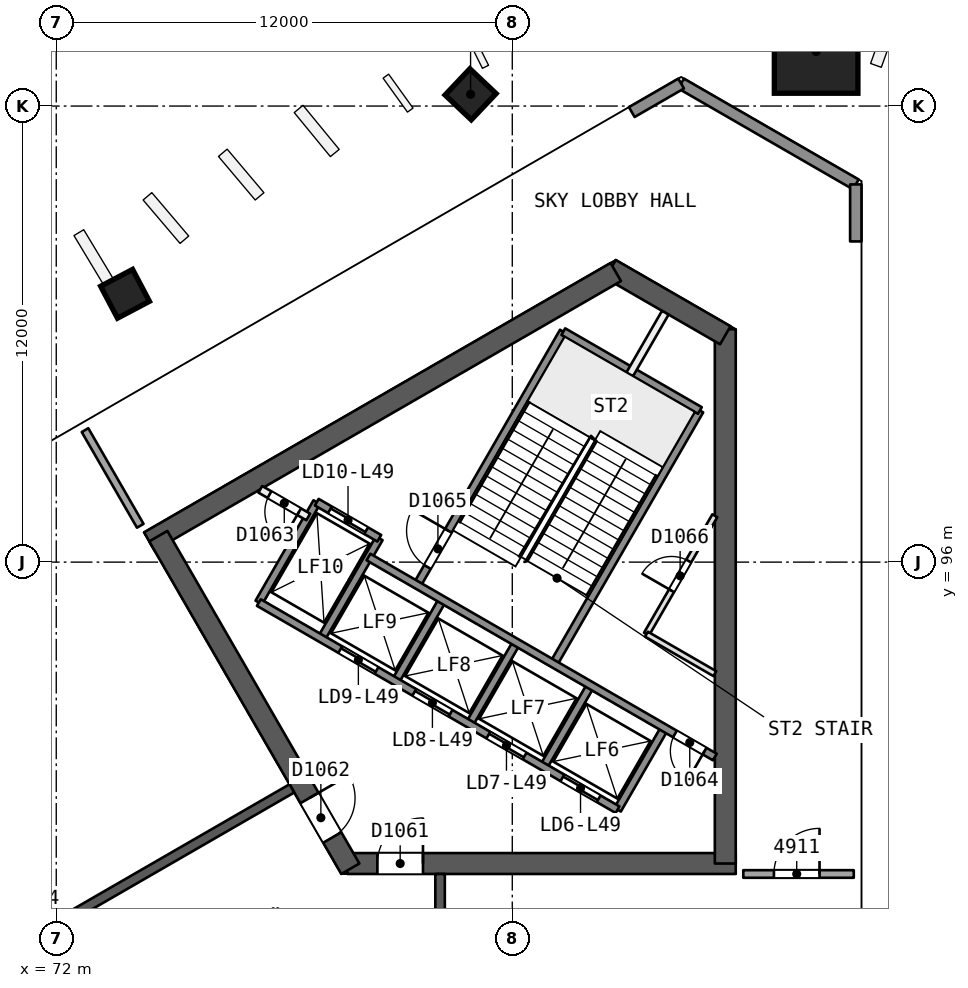
"""IFC4 building model, lengths in metres.
Left out: names, types, materials, properties, quantities, classifications, styles, units other than length and angle.
Written with IfcOpenShell. Run it as: python <this file> out.ifc"""

import sys

from ifc_helpers import new_model, si_unit, direction, frame, frame_2d, origin, origin_2d, place, context, subcontext, project, spatial, rectangle, extrude, element, fill, save


model = new_model("IFC4")
c1 = context("Model", 3, precision=1e-05, world=origin(), true_north=direction((0.0, 1.0)))
c2 = subcontext(c1, "Body", "Model", "MODEL_VIEW")
j1 = project(units=[si_unit("LENGTHUNIT", "METRE"), si_unit("PLANEANGLEUNIT", "RADIAN")], contexts=[c1])
p1 = place(None, origin())
s1 = spatial("IfcSite", under=j1, at=p1, CompositionType="ELEMENT")
p2 = place(p1, origin())
s2 = spatial("IfcBuilding", under=s1, at=p2, CompositionType="ELEMENT")
p3 = place(p2, frame((0.0, 0.0, 201.4)))
s3 = spatial("IfcBuildingStorey", under=s2, at=p3, CompositionType="ELEMENT", Elevation=201.4)
p4 = place(p3, frame((79.659, 88.069, 0.0), z_axis=(0.0, 0.0, 1.0), x_axis=(1.0, 0.0, 0.0)))
e1 = element("IfcWall", 1, at=p4, inside=s3, PredefinedType="SHEAR", context=c2, shape_type="SweptSolid", body=[
    extrude(rectangle(XDim=10.221, YDim=0.55, at=frame_2d((5.111, 0.0))), origin(), (0.0, 0.0, 1.0), 4.4),
])
p5 = place(p4, frame((0.791, 0.0, 0.0)))
e2 = element("IfcOpeningElement", 2, at=p5, cuts=e1, PredefinedType="OPENING", context=c2, shape_type="SweptSolid", body=[
    extrude(rectangle(XDim=1.2, YDim=2.1, at=frame_2d((0.6, 1.05))), frame((0.0, 0.286, 0.0), z_axis=(0.0, -1.0, 0.0), x_axis=(1.0, 0.0, 0.0)), (0.0, 0.0, 1.0), 0.571),
])
p6 = place(p3, frame((89.605, 88.069, 0.0), z_axis=(0.0, 0.0, 1.0), x_axis=(0.0, 1.0, 0.0)))
e3 = element("IfcWall", 3, at=p6, inside=s3, PredefinedType="SHEAR", context=c2, shape_type="SweptSolid", body=[
    extrude(rectangle(XDim=14.058, YDim=0.55, at=frame_2d((7.029, 0.0))), origin(), (0.0, 0.0, 1.0), 4.4),
])
p7 = place(p3, frame((89.605, 101.969, 0.0), z_axis=(0.0, 0.0, 1.0), x_axis=(-0.865997833373, 0.500047750313, 0.0)))
e4 = element("IfcWall", 4, at=p7, inside=s3, PredefinedType="SHEAR", context=c2, shape_type="SweptSolid", body=[
    extrude(rectangle(XDim=3.487, YDim=0.55, at=frame_2d((1.743, 0.0))), origin(), (0.0, 0.0, 1.0), 4.4),
])
p8 = place(p3, frame((86.723, 103.633, 0.0), z_axis=(0.0, 0.0, 1.0), x_axis=(-0.866023530946, -0.500003243837, 0.0)))
e5 = element("IfcWall", 5, at=p8, inside=s3, PredefinedType="SHEAR", context=c2, shape_type="SweptSolid", body=[
    extrude(rectangle(XDim=14.175, YDim=0.55, at=frame_2d((7.087, 0.0))), origin(), (0.0, 0.0, 1.0), 4.4),
])
p9 = place(p3, frame((74.686, 96.683, 0.0), z_axis=(0.0, 0.0, 1.0), x_axis=(0.499997818338, -0.866026663364, 0.0)))
e6 = element("IfcWall", 6, at=p9, inside=s3, PredefinedType="SHEAR", context=c2, shape_type="SweptSolid", body=[
    extrude(rectangle(XDim=10.105, YDim=0.55, at=frame_2d((5.052, 0.0))), origin(), (0.0, 0.0, 1.0), 4.4),
])
p10 = place(p9, frame((7.955, 0.0, 0.0)))
e7 = element("IfcOpeningElement", 7, at=p10, cuts=e6, PredefinedType="OPENING", context=c2, shape_type="SweptSolid", body=[
    extrude(rectangle(XDim=1.2, YDim=2.1, at=frame_2d((0.6, 1.05))), frame((0.0, 0.286, 0.0), z_axis=(0.0, -1.0, 0.0), x_axis=(1.0, 0.0, 0.0)), (0.0, 0.0, 1.0), 0.571),
])
p11 = place(p3, frame((82.1, 72.206, 0.0), z_axis=(0.0, 0.0, 1.0), x_axis=(0.0, 1.0, 0.0)))
e8 = element("IfcWall", 8, at=p11, inside=s3, PredefinedType="SHEAR", context=c2, shape_type="SweptSolid", body=[
    extrude(rectangle(XDim=15.588, YDim=0.25, at=frame_2d((7.794, 0.0))), origin(), (0.0, 0.0, 1.0), 4.0),
])
p12 = place(p11, frame((3.297, 0.0, 0.0)))
e9 = element("IfcOpeningElement", 9, at=p12, cuts=e8, PredefinedType="OPENING", context=c2, shape_type="SweptSolid", body=[
    extrude(rectangle(XDim=1.2, YDim=2.4, at=frame_2d((0.6, 1.2))), frame((0.0, 0.135, 0.0), z_axis=(0.0, -1.0, 0.0), x_axis=(1.0, 0.0, 0.0)), (0.0, 0.0, 1.0), 0.271),
])
p13 = place(p11, frame((11.091, 0.0, 0.0)))
e10 = element("IfcOpeningElement", 10, at=p13, cuts=e8, PredefinedType="OPENING", context=c2, shape_type="SweptSolid", body=[
    extrude(rectangle(XDim=1.2, YDim=2.4, at=frame_2d((0.6, 1.2))), frame((0.0, 0.135, 0.0), z_axis=(0.0, -1.0, 0.0), x_axis=(1.0, 0.0, 0.0)), (0.0, 0.0, 1.0), 0.271),
])
p14 = place(p3, frame((78.2, 90.046, 0.0), z_axis=(0.0, 0.0, 1.0), x_axis=(-0.866026492143, -0.499998114903, 0.0)))
e11 = element("IfcWall", 11, at=p14, inside=s3, PredefinedType="SHEAR", context=c2, shape_type="SweptSolid", body=[
    extrude(rectangle(XDim=15.588, YDim=0.25, at=frame_2d((7.794, 0.0))), origin(), (0.0, 0.0, 1.0), 4.0),
])
p15 = place(p14, frame((7.194, 0.0, 0.0)))
e12 = element("IfcOpeningElement", 12, at=p15, cuts=e11, PredefinedType="OPENING", context=c2, shape_type="SweptSolid", body=[
    extrude(rectangle(XDim=1.2, YDim=2.4, at=frame_2d((0.6, 1.2))), frame((0.0, 0.135, 0.0), z_axis=(0.0, -1.0, 0.0), x_axis=(1.0, 0.0, 0.0)), (0.0, 0.0, 1.0), 0.271),
])
p16 = place(p3, frame((92.017, 109.473, 0.0), z_axis=(-0.017633169529, -0.030497620254, 0.999379290606), x_axis=(0.500230591094, 0.865175313, 0.035228305505)))
e13 = element("IfcColumn", 13, at=p16, inside=s3, PredefinedType="COLUMN", context=c2, shape_type="SweptSolid", body=[
    extrude(rectangle(XDim=2.2, YDim=2.2, at=origin_2d()), origin(), (0.0, 0.0, 1.0), 4.403),
])
p17 = place(p3, frame((82.913, 108.343, 0.0), z_axis=(-0.008374576728, -0.028118611929, 0.999569512404), x_axis=(0.866035454693, 0.49952834229, 0.021307896754)))
e14 = element("IfcColumn", 14, at=p17, inside=s3, PredefinedType="COLUMN", context=c2, shape_type="SweptSolid", body=[
    extrude(rectangle(XDim=0.95, YDim=0.95, at=origin_2d()), origin(), (0.0, 0.0, 1.0), 4.402),
])
p18 = place(p3, frame((73.809, 103.087, 0.0), z_axis=(0.000832053271, -0.022798259613, 0.999739739655), x_axis=(0.866596562917, 0.498895634194, 0.010655670932)))
e15 = element("IfcColumn", 15, at=p18, inside=s3, PredefinedType="COLUMN", context=c2, shape_type="SweptSolid", body=[
    extrude(rectangle(XDim=0.95, YDim=0.95, at=origin_2d()), origin(), (0.0, 0.0, 1.0), 4.401),
])
p19 = place(p3, frame((90.079, 87.794, 0.0), z_axis=(0.0, 0.0, 1.0), x_axis=(1.0, 0.0, 0.0)))
e16 = element("IfcWall", 16, at=p19, inside=s3, PredefinedType="PARTITIONING", context=c2, shape_type="SweptSolid", body=[
    extrude(rectangle(XDim=2.906, YDim=0.2, at=frame_2d((1.453, 0.0))), origin(), (0.0, 0.0, 1.0), 4.0),
])
p20 = place(p19, frame((0.806, 0.0, 0.0)))
e17 = element("IfcOpeningElement", 17, at=p20, cuts=e16, PredefinedType="OPENING", context=c2, shape_type="SweptSolid", body=[
    extrude(rectangle(XDim=1.2, YDim=2.4, at=frame_2d((0.6, 1.2))), frame((0.0, 0.11, 0.0), z_axis=(0.0, -1.0, 0.0), x_axis=(1.0, 0.0, 0.0)), (0.0, 0.0, 1.0), 0.221),
])
p21 = place(p3, frame((72.757, 99.473, 0.0), z_axis=(0.0, 0.0, 1.0), x_axis=(0.499996306993, -0.866027535932, 0.0)))
e18 = element("IfcWall", 18, at=p21, inside=s3, PredefinedType="PARTITIONING", context=c2, shape_type="SweptSolid", body=[
    extrude(rectangle(XDim=2.907, YDim=0.2, at=frame_2d((1.453, 0.0))), origin(), (0.0, 0.0, 1.0), 4.0),
])
p22 = place(p3, frame((88.443, 108.592, 0.0), z_axis=(0.0, 0.0, 1.0), x_axis=(0.866029311292, -0.499993231937, 0.0)))
e19 = element("IfcWall", 19, at=p22, inside=s3, PredefinedType="SOLIDWALL", context=c2, shape_type="SweptSolid", body=[
    extrude(rectangle(XDim=5.307, YDim=0.3, at=frame_2d((2.654, 0.0))), origin(), (0.0, 0.0, 1.0), 4.0),
])
for number, where, z_axis, x_axis in (
    (20, (93.04, 105.938, 0.0), (0.0, 0.0, 1.0), (0.0, -1.0, 0.0)),
    (21, (87.144, 107.842, 0.0), (0.0, 0.0, 1.0), (0.866, 0.5, 0.0)),
):
    element("IfcWall", number, at=place(p3, frame(where, z_axis=z_axis, x_axis=x_axis)), inside=s3, PredefinedType="SOLIDWALL", context=c2, shape_type="SweptSolid", body=[
        extrude(rectangle(XDim=1.5, YDim=0.3, at=frame_2d((0.75, 0.0))), origin(), (0.0, 0.0, 1.0), 4.0),
    ])
p23 = place(p3, frame((86.77, 89.486, 0.0), z_axis=(0.0, 0.0, 1.0), x_axis=(0.499961042966, 0.86604789447, 0.0)))
e22 = element("IfcWall", 22, at=p23, inside=s3, PredefinedType="SOLIDWALL", context=c2, shape_type="SweptSolid", body=[
    extrude(rectangle(XDim=2.48, YDim=0.2, at=frame_2d((1.24, 0.0))), origin(), (0.0, 0.0, 1.0), 4.0),
])
p24 = place(p3, frame((87.531, 94.104, 0.0), z_axis=(0.0, 0.0, 1.0), x_axis=(0.500014173611, 0.866017220491, 0.0)))
e23 = element("IfcWall", 23, at=p24, inside=s3, PredefinedType="PARTITIONING", context=c2, shape_type="SweptSolid", body=[
    extrude(rectangle(XDim=3.598, YDim=0.15, at=frame_2d((1.799, 0.0))), origin(), (0.0, 0.0, 1.0), 4.0),
])
p25 = place(p24, frame((1.322, 0.0, 0.0)))
e24 = element("IfcOpeningElement", 24, at=p25, cuts=e23, PredefinedType="OPENING", context=c2, shape_type="SweptSolid", body=[
    extrude(rectangle(XDim=0.9, YDim=2.1, at=frame_2d((0.45, 1.05))), frame((0.0, 0.085, 0.0), z_axis=(0.0, -1.0, 0.0), x_axis=(1.0, 0.0, 0.0)), (0.0, 0.0, 1.0), 0.171),
])
p26 = place(p3, frame((84.821, 90.611, 0.0), z_axis=(0.0, 0.0, 1.0), x_axis=(0.499961042966, 0.86604789447, 0.0)))
e25 = element("IfcWall", 25, at=p26, inside=s3, PredefinedType="SOLIDWALL", context=c2, shape_type="SweptSolid", body=[
    extrude(rectangle(XDim=2.48, YDim=0.2, at=frame_2d((1.24, 0.0))), origin(), (0.0, 0.0, 1.0), 4.0),
])
p27 = place(p3, frame((85.087, 93.321, 0.0), z_axis=(0.0, 0.0, 1.0), x_axis=(0.500019787375, 0.866013979237, 0.0)))
e26 = element("IfcWall", 26, at=p27, inside=s3, PredefinedType="SOLIDWALL", context=c2, shape_type="SweptSolid", body=[
    extrude(rectangle(XDim=7.7, YDim=0.2, at=frame_2d((3.85, 0.0))), origin(), (0.0, 0.0, 1.0), 4.0),
])
p28 = place(p3, frame((82.873, 91.736, 0.0), z_axis=(0.0, 0.0, 1.0), x_axis=(0.499961042966, 0.86604789447, 0.0)))
e27 = element("IfcWall", 27, at=p28, inside=s3, PredefinedType="SOLIDWALL", context=c2, shape_type="SweptSolid", body=[
    extrude(rectangle(XDim=2.48, YDim=0.2, at=frame_2d((1.24, 0.0))), origin(), (0.0, 0.0, 1.0), 4.0),
])
p29 = place(p3, frame((87.09, 100.94, 0.0), z_axis=(0.0, 0.0, 1.0), x_axis=(0.499951854219, 0.86605319898, 0.0)))
e28 = element("IfcWall", 28, at=p29, inside=s3, PredefinedType="PARTITIONING", context=c2, shape_type="SweptSolid", body=[
    extrude(rectangle(XDim=1.873, YDim=0.2, at=frame_2d((0.937, 0.0))), origin(), (0.0, 0.0, 1.0), 4.0),
])
p30 = place(p3, frame((80.924, 92.861, 0.0), z_axis=(0.0, 0.0, 1.0), x_axis=(0.499961042966, 0.86604789447, 0.0)))
e29 = element("IfcWall", 29, at=p30, inside=s3, PredefinedType="SOLIDWALL", context=c2, shape_type="SweptSolid", body=[
    extrude(rectangle(XDim=2.48, YDim=0.2, at=frame_2d((1.24, 0.0))), origin(), (0.0, 0.0, 1.0), 4.0),
])
p31 = place(p3, frame((81.493, 95.396, 0.0), z_axis=(0.0, 0.0, 1.0), x_axis=(0.500006057782, 0.866021906294, 0.0)))
e30 = element("IfcWall", 30, at=p31, inside=s3, PredefinedType="SOLIDWALL", context=c2, shape_type="SweptSolid", body=[
    extrude(rectangle(XDim=7.7, YDim=0.2, at=frame_2d((3.85, 0.0))), origin(), (0.0, 0.0, 1.0), 4.0),
])
p32 = place(p31, frame((0.55, 0.0, 0.0)))
e31 = element("IfcOpeningElement", 31, at=p32, cuts=e30, PredefinedType="OPENING", context=c2, shape_type="SweptSolid", body=[
    extrude(rectangle(XDim=1.1, YDim=2.1, at=frame_2d((0.55, 1.05))), frame((0.0, 0.11, 0.0), z_axis=(0.0, -1.0, 0.0), x_axis=(1.0, 0.0, 0.0)), (0.0, 0.0, 1.0), 0.221),
])
for number, where, z_axis, x_axis in (
    (32, (78.976, 93.986, 0.0), (0.0, 0.0, 1.0), (0.5, 0.866, 0.0)),
    (33, (77.33, 94.936, 0.0), (0.0, 0.0, 1.0), (0.5, 0.866, 0.0)),
):
    element("IfcWall", number, at=place(p3, frame(where, z_axis=z_axis, x_axis=x_axis)), inside=s3, PredefinedType="SOLIDWALL", context=c2, shape_type="SweptSolid", body=[
        extrude(rectangle(XDim=3.05, YDim=0.2, at=frame_2d((1.525, 0.0))), origin(), (0.0, 0.0, 1.0), 4.0),
    ])
p33 = place(p3, frame((86.77, 89.486, 0.0), z_axis=(0.0, 0.0, 1.0), x_axis=(-0.86601811187, 0.500012629753, 0.0)))
e34 = element("IfcWall", 34, at=p33, inside=s3, PredefinedType="SOLIDWALL", context=c2, shape_type="SweptSolid", body=[
    extrude(rectangle(XDim=10.9, YDim=0.2, at=frame_2d((5.45, 0.0))), origin(), (0.0, 0.0, 1.0), 4.0),
])
p34 = place(p33, frame((0.575, 0.0, 0.0)))
e35 = element("IfcOpeningElement", 35, at=p34, cuts=e34, PredefinedType="OPENING", context=c2, shape_type="SweptSolid", body=[
    extrude(rectangle(XDim=1.1, YDim=2.1, at=frame_2d((0.55, 1.05))), frame((0.0, 0.11, 0.0), z_axis=(0.0, -1.0, 0.0), x_axis=(1.0, 0.0, 0.0)), (0.0, 0.0, 1.0), 0.221),
])
p35 = place(p33, frame((2.825, 0.0, 0.0)))
e36 = element("IfcOpeningElement", 36, at=p35, cuts=e34, PredefinedType="OPENING", context=c2, shape_type="SweptSolid", body=[
    extrude(rectangle(XDim=1.1, YDim=2.1, at=frame_2d((0.55, 1.05))), frame((0.0, 0.11, 0.0), z_axis=(0.0, -1.0, 0.0), x_axis=(1.0, 0.0, 0.0)), (0.0, 0.0, 1.0), 0.221),
])
p36 = place(p33, frame((5.075, 0.0, 0.0)))
e37 = element("IfcOpeningElement", 37, at=p36, cuts=e34, PredefinedType="OPENING", context=c2, shape_type="SweptSolid", body=[
    extrude(rectangle(XDim=1.1, YDim=2.1, at=frame_2d((0.55, 1.05))), frame((0.0, 0.11, 0.0), z_axis=(0.0, -1.0, 0.0), x_axis=(1.0, 0.0, 0.0)), (0.0, 0.0, 1.0), 0.221),
])
p37 = place(p33, frame((7.325, 0.0, 0.0)))
e38 = element("IfcOpeningElement", 38, at=p37, cuts=e34, PredefinedType="OPENING", context=c2, shape_type="SweptSolid", body=[
    extrude(rectangle(XDim=1.1, YDim=2.1, at=frame_2d((0.55, 1.05))), frame((0.0, 0.11, 0.0), z_axis=(0.0, -1.0, 0.0), x_axis=(1.0, 0.0, 0.0)), (0.0, 0.0, 1.0), 0.221),
])
p38 = place(p3, frame((89.33, 90.872, 0.0), z_axis=(0.0, 0.0, 1.0), x_axis=(-0.866027589512, 0.49999621419, 0.0)))
e39 = element("IfcWall", 39, at=p38, inside=s3, PredefinedType="SOLIDWALL", context=c2, shape_type="SweptSolid", body=[
    extrude(rectangle(XDim=10.524, YDim=0.2, at=frame_2d((5.262, 0.0))), origin(), (0.0, 0.0, 1.0), 4.0),
])
p39 = place(p38, frame((0.312, 0.0, 0.0)))
e40 = element("IfcOpeningElement", 40, at=p39, cuts=e39, PredefinedType="OPENING", context=c2, shape_type="SweptSolid", body=[
    extrude(rectangle(XDim=0.9, YDim=2.1, at=frame_2d((0.45, 1.05))), frame((0.0, 0.11, 0.0), z_axis=(0.0, -1.0, 0.0), x_axis=(1.0, 0.0, 0.0)), (0.0, 0.0, 1.0), 0.221),
])
p40 = place(p3, frame((78.63, 97.188, 0.0), z_axis=(0.0, 0.0, 1.0), x_axis=(-0.866003949776, 0.500037157592, 0.0)))
e41 = element("IfcWall", 41, at=p40, inside=s3, PredefinedType="PARTITIONING", context=c2, shape_type="SweptSolid", body=[
    extrude(rectangle(XDim=1.455, YDim=0.2, at=frame_2d((0.728, 0.0))), origin(), (0.0, 0.0, 1.0), 4.0),
])
p41 = place(p40, frame((0.278, 0.0, 0.0)))
e42 = element("IfcOpeningElement", 42, at=p41, cuts=e41, PredefinedType="OPENING", context=c2, shape_type="SweptSolid", body=[
    extrude(rectangle(XDim=0.9, YDim=2.1, at=frame_2d((0.45, 1.05))), frame((0.0, 0.11, 0.0), z_axis=(0.0, -1.0, 0.0), x_axis=(1.0, 0.0, 0.0)), (0.0, 0.0, 1.0), 0.221),
])
p42 = place(p3, frame((80.5, 96.627, 0.0), z_axis=(0.0, 0.0, 1.0), x_axis=(-0.86601224135, 0.500022797313, 0.0)))
e43 = element("IfcWall", 43, at=p42, inside=s3, PredefinedType="SOLIDWALL", context=c2, shape_type="SweptSolid", body=[
    extrude(rectangle(XDim=1.9, YDim=0.2, at=frame_2d((0.95, 0.0))), origin(), (0.0, 0.0, 1.0), 4.0),
])
p43 = place(p42, frame((0.4, 0.0, 0.0)))
e44 = element("IfcOpeningElement", 44, at=p43, cuts=e43, PredefinedType="OPENING", context=c2, shape_type="SweptSolid", body=[
    extrude(rectangle(XDim=1.1, YDim=2.1, at=frame_2d((0.55, 1.05))), frame((0.0, 0.11, 0.0), z_axis=(0.0, -1.0, 0.0), x_axis=(1.0, 0.0, 0.0)), (0.0, 0.0, 1.0), 0.221),
])
p44 = place(p3, frame((89.33, 93.065, 0.0), z_axis=(0.0, 0.0, 1.0), x_axis=(-0.865999660441, 0.500044586128, 0.0)))
e45 = element("IfcWall", 45, at=p44, inside=s3, PredefinedType="PARTITIONING", context=c2, shape_type="SweptSolid", body=[
    extrude(rectangle(XDim=2.077, YDim=0.15, at=frame_2d((1.039, 0.0))), origin(), (0.0, 0.0, 1.0), 4.0),
])
p45 = place(p3, frame((88.937, 99.99, 0.0), z_axis=(0.0, 0.0, 1.0), x_axis=(-0.866004344652, 0.500036473714, 0.0)))
e46 = element("IfcWall", 46, at=p45, inside=s3, PredefinedType="SOLIDWALL", context=c2, shape_type="SweptSolid", body=[
    extrude(rectangle(XDim=4.15, YDim=0.2, at=frame_2d((2.075, 0.0))), origin(), (0.0, 0.0, 1.0), 4.0),
])
p46 = place(p20, origin())
e47 = element("IfcDoor", 47, at=p46, inside=s3, OperationType="SINGLE_SWING_RIGHT", PredefinedType="NOTDEFINED", context=c2, shape_type="SweptSolid", body=[
    extrude(rectangle(XDim=1.2, YDim=2.4, at=frame_2d((0.6, 1.2))), frame((0.0, 0.025, 0.0), z_axis=(0.0, -1.0, 0.0), x_axis=(1.0, 0.0, 0.0)), (0.0, 0.0, 1.0), 0.05),
])
fill(e17, e47)
p47 = place(p5, origin())
e48 = element("IfcDoor", 48, at=p47, inside=s3, OperationType="SINGLE_SWING_RIGHT", PredefinedType="NOTDEFINED", context=c2, shape_type="SweptSolid", body=[
    extrude(rectangle(XDim=1.2, YDim=2.1, at=frame_2d((0.6, 1.05))), frame((0.0, 0.025, 0.0), z_axis=(0.0, -1.0, 0.0), x_axis=(1.0, 0.0, 0.0)), (0.0, 0.0, 1.0), 0.05),
])
fill(e2, e48)
p48 = place(p10, origin())
e49 = element("IfcDoor", 49, at=p48, inside=s3, OperationType="SINGLE_SWING_LEFT", PredefinedType="NOTDEFINED", context=c2, shape_type="SweptSolid", body=[
    extrude(rectangle(XDim=1.2, YDim=2.1, at=frame_2d((0.6, 1.05))), frame((0.0, 0.025, 0.0), z_axis=(0.0, -1.0, 0.0), x_axis=(1.0, 0.0, 0.0)), (0.0, 0.0, 1.0), 0.05),
])
fill(e7, e49)
p49 = place(p34, origin())
e50 = element("IfcDoor", 50, at=p49, inside=s3, OperationType="SLIDING_TO_RIGHT", PredefinedType="NOTDEFINED", context=c2, shape_type="SweptSolid", body=[
    extrude(rectangle(XDim=1.1, YDim=2.1, at=frame_2d((0.55, 1.05))), frame((0.0, 0.025, 0.0), z_axis=(0.0, -1.0, 0.0), x_axis=(1.0, 0.0, 0.0)), (0.0, 0.0, 1.0), 0.05),
])
fill(e35, e50)
p50 = place(p35, origin())
e51 = element("IfcDoor", 51, at=p50, inside=s3, OperationType="SLIDING_TO_LEFT", PredefinedType="NOTDEFINED", context=c2, shape_type="SweptSolid", body=[
    extrude(rectangle(XDim=1.1, YDim=2.1, at=frame_2d((0.55, 1.05))), frame((0.0, 0.025, 0.0), z_axis=(0.0, -1.0, 0.0), x_axis=(1.0, 0.0, 0.0)), (0.0, 0.0, 1.0), 0.05),
])
fill(e36, e51)
p51 = place(p36, origin())
e52 = element("IfcDoor", 52, at=p51, inside=s3, OperationType="SLIDING_TO_RIGHT", PredefinedType="NOTDEFINED", context=c2, shape_type="SweptSolid", body=[
    extrude(rectangle(XDim=1.1, YDim=2.1, at=frame_2d((0.55, 1.05))), frame((0.0, 0.025, 0.0), z_axis=(0.0, -1.0, 0.0), x_axis=(1.0, 0.0, 0.0)), (0.0, 0.0, 1.0), 0.05),
])
fill(e37, e52)
p52 = place(p37, origin())
e53 = element("IfcDoor", 53, at=p52, inside=s3, OperationType="SLIDING_TO_LEFT", PredefinedType="NOTDEFINED", context=c2, shape_type="SweptSolid", body=[
    extrude(rectangle(XDim=1.1, YDim=2.1, at=frame_2d((0.55, 1.05))), frame((0.0, 0.025, 0.0), z_axis=(0.0, -1.0, 0.0), x_axis=(1.0, 0.0, 0.0)), (0.0, 0.0, 1.0), 0.05),
])
fill(e38, e53)
p53 = place(p43, origin())
e54 = element("IfcDoor", 54, at=p53, inside=s3, OperationType="SLIDING_TO_RIGHT", PredefinedType="NOTDEFINED", context=c2, shape_type="SweptSolid", body=[
    extrude(rectangle(XDim=1.1, YDim=2.1, at=frame_2d((0.55, 1.05))), frame((0.0, 0.025, 0.0), z_axis=(0.0, -1.0, 0.0), x_axis=(1.0, 0.0, 0.0)), (0.0, 0.0, 1.0), 0.05),
])
fill(e44, e54)
p54 = place(p41, origin())
e55 = element("IfcDoor", 55, at=p54, inside=s3, OperationType="SINGLE_SWING_LEFT", PredefinedType="NOTDEFINED", context=c2, shape_type="SweptSolid", body=[
    extrude(rectangle(XDim=0.9, YDim=2.1, at=frame_2d((0.45, 1.05))), frame((0.0, 0.025, 0.0), z_axis=(0.0, -1.0, 0.0), x_axis=(1.0, 0.0, 0.0)), (0.0, 0.0, 1.0), 0.05),
])
fill(e42, e55)
p55 = place(p39, origin())
e56 = element("IfcDoor", 56, at=p55, inside=s3, OperationType="SINGLE_SWING_LEFT", PredefinedType="NOTDEFINED", context=c2, shape_type="SweptSolid", body=[
    extrude(rectangle(XDim=0.9, YDim=2.1, at=frame_2d((0.45, 1.05))), frame((0.0, 0.025, 0.0), z_axis=(0.0, -1.0, 0.0), x_axis=(1.0, 0.0, 0.0)), (0.0, 0.0, 1.0), 0.05),
])
fill(e40, e56)
p56 = place(p32, origin())
e57 = element("IfcDoor", 57, at=p56, inside=s3, OperationType="SINGLE_SWING_RIGHT", PredefinedType="NOTDEFINED", context=c2, shape_type="SweptSolid", body=[
    extrude(rectangle(XDim=1.1, YDim=2.1, at=frame_2d((0.55, 1.05))), frame((0.0, 0.025, 0.0), z_axis=(0.0, -1.0, 0.0), x_axis=(1.0, 0.0, 0.0)), (0.0, 0.0, 1.0), 0.05),
])
fill(e31, e57)
p57 = place(p25, origin())
e58 = element("IfcDoor", 58, at=p57, inside=s3, OperationType="SINGLE_SWING_LEFT", PredefinedType="NOTDEFINED", context=c2, shape_type="SweptSolid", body=[
    extrude(rectangle(XDim=0.9, YDim=2.1, at=frame_2d((0.45, 1.05))), frame((0.0, 0.025, 0.0), z_axis=(0.0, -1.0, 0.0), x_axis=(1.0, 0.0, 0.0)), (0.0, 0.0, 1.0), 0.05),
])
fill(e24, e58)
save(model, sys.argv[1])
